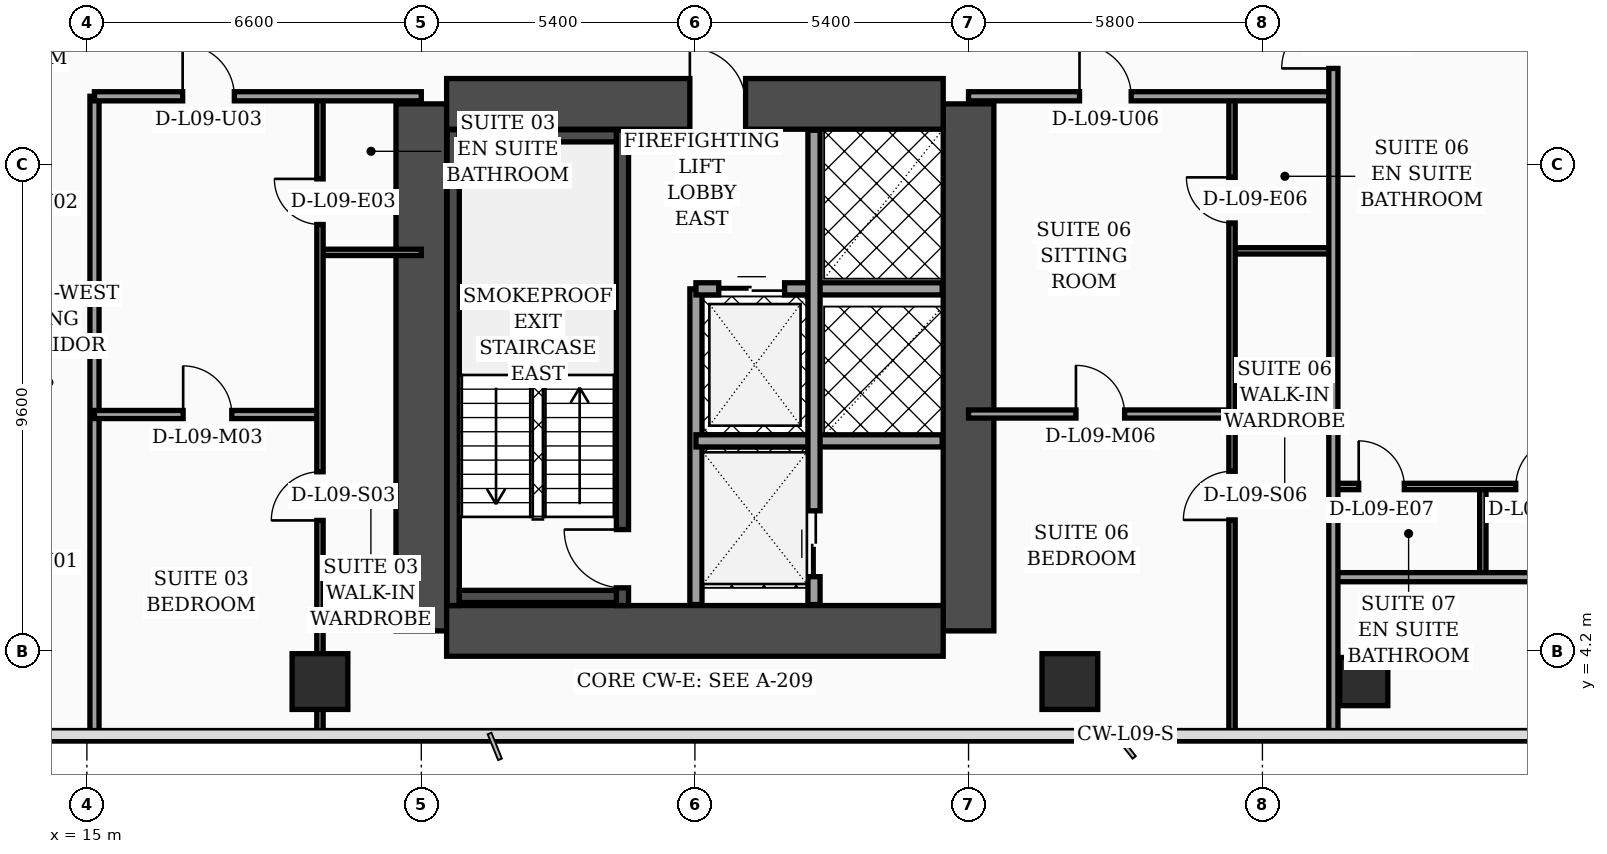
"""IFC4 building model, lengths in metres.
Left out: names, types, materials, properties, quantities, classifications, styles, units other than length and angle.
Written with IfcOpenShell. Run it as: python <this file> out.ifc"""

import sys

from ifc_helpers import new_model, si_unit, direction, frame, frame_2d, origin, origin_2d, place, context, subcontext, project, spatial, rectangle, hollow_rectangle, extrude, element, fill, save


model = new_model("IFC4")
c1 = context("Model", 3, precision=1e-05, world=origin(), true_north=direction((0.0, 1.0)))
c2 = subcontext(c1, "Body", "Model", "MODEL_VIEW")
j1 = project(units=[si_unit("LENGTHUNIT", "METRE"), si_unit("PLANEANGLEUNIT", "RADIAN")], contexts=[c1])
p1 = place(None, origin())
s1 = spatial("IfcSite", under=j1, at=p1, CompositionType="ELEMENT")
p2 = place(p1, origin())
s2 = spatial("IfcBuilding", under=s1, at=p2, CompositionType="ELEMENT")
p3 = place(p2, frame((0.0, 0.0, 42.2)))
s3 = spatial("IfcBuildingStorey", under=s2, at=p3, CompositionType="ELEMENT", Elevation=42.2)
for number, where, z_axis, x_axis in (
    (1, (21.6, 4.6, 0.0), (0.0, 0.0, 1.0), (0.0, 1.0, 0.0)),
    (2, (32.4, 4.6, 0.0), (0.0, 0.0, 1.0), (0.0, 1.0, 0.0)),
):
    element("IfcWall", number, at=place(p3, frame(where, z_axis=z_axis, x_axis=x_axis)), inside=s3, PredefinedType="SHEAR", context=c2, shape_type="SweptSolid", body=[
        extrude(rectangle(XDim=10.4, YDim=1.0, at=frame_2d((5.2, 0.0))), origin(), (0.0, 0.0, 1.0), 3.52),
    ])
p4 = place(p3, frame((22.1, 15.0, 0.0), z_axis=(0.0, 0.0, 1.0), x_axis=(1.0, 0.0, 0.0)))
e3 = element("IfcWall", 3, at=p4, inside=s3, PredefinedType="SHEAR", context=c2, shape_type="SweptSolid", body=[
    extrude(rectangle(XDim=9.8, YDim=1.0, at=frame_2d((4.9, 0.0))), origin(), (0.0, 0.0, 1.0), 3.52),
])
p5 = place(p4, frame((4.8, 0.0, 0.0)))
e4 = element("IfcOpeningElement", 4, at=p5, cuts=e3, PredefinedType="OPENING", context=c2, shape_type="SweptSolid", body=[
    extrude(rectangle(XDim=1.1, YDim=2.2, at=frame_2d((0.55, 1.1))), frame((0.0, 0.51, 0.0), z_axis=(0.0, -1.0, 0.0), x_axis=(1.0, 0.0, 0.0)), (0.0, 0.0, 1.0), 1.02),
])
p6 = place(p3, frame((22.1, 4.6, 0.0), z_axis=(0.0, 0.0, 1.0), x_axis=(1.0, 0.0, 0.0)))
e5 = element("IfcWall", 5, at=p6, inside=s3, PredefinedType="SHEAR", context=c2, shape_type="SweptSolid", body=[
    extrude(rectangle(XDim=9.8, YDim=1.0, at=frame_2d((4.9, 0.0))), origin(), (0.0, 0.0, 1.0), 3.52),
])
p7 = place(p3, frame((22.23, 5.1, 0.0), z_axis=(0.0, 0.0, 1.0), x_axis=(0.0, 1.0, 0.0)))
e6 = element("IfcWall", 6, at=p7, inside=s3, PredefinedType="SOLIDWALL", context=c2, shape_type="SweptSolid", body=[
    extrude(rectangle(XDim=9.39, YDim=0.24, at=frame_2d((4.695, 0.0))), origin(), (0.0, 0.0, 1.0), 3.52),
])
p8 = place(p3, frame((25.57, 5.1, 0.0), z_axis=(0.0, 0.0, 1.0), x_axis=(0.0, 1.0, 0.0)))
e7 = element("IfcWall", 7, at=p8, inside=s3, PredefinedType="SOLIDWALL", context=c2, shape_type="SweptSolid", body=[
    extrude(rectangle(XDim=9.39, YDim=0.24, at=frame_2d((4.695, 0.0))), origin(), (0.0, 0.0, 1.0), 3.52),
])
p9 = place(p8, frame((0.35, 0.0, 0.0)))
e8 = element("IfcOpeningElement", 8, at=p9, cuts=e7, PredefinedType="OPENING", context=c2, shape_type="SweptSolid", body=[
    extrude(rectangle(XDim=1.15, YDim=2.2, at=frame_2d((0.575, 1.1))), frame((0.0, 0.13, 0.0), z_axis=(0.0, -1.0, 0.0), x_axis=(1.0, 0.0, 0.0)), (0.0, 0.0, 1.0), 0.26),
])
for number, where, z_axis, x_axis in (
    (9, (22.35, 5.28, 0.0), (0.0, 0.0, 1.0), (1.0, 0.0, 0.0)),
    (10, (22.35, 14.37, 0.0), (0.0, 0.0, 1.0), (1.0, 0.0, 0.0)),
):
    element("IfcWall", number, at=place(p3, frame(where, z_axis=z_axis, x_axis=x_axis)), inside=s3, PredefinedType="SOLIDWALL", context=c2, shape_type="SweptSolid", body=[
        extrude(rectangle(XDim=3.1, YDim=0.24, at=frame_2d((1.55, 0.0))), origin(), (0.0, 0.0, 1.0), 3.52),
    ])
for number, where, z_axis, x_axis in (
    (11, (19.6, 3.6, 0.0), (0.0, 0.0, 1.0), (1.0, 0.0, 0.0)),
    (12, (34.4, 3.6, 0.0), (0.0, 0.0, 1.0), (1.0, 0.0, 0.0)),
):
    element("IfcColumn", number, at=place(p3, frame(where, z_axis=z_axis, x_axis=x_axis)), inside=s3, PredefinedType="COLUMN", context=c2, shape_type="SweptSolid", body=[
        extrude(hollow_rectangle(XDim=1.1, YDim=1.1, WallThickness=0.045, at=origin_2d()), origin(), (0.0, 0.0, 1.0), 3.52),
    ])
p10 = place(p3, frame((40.2, 3.6, 0.0), z_axis=(0.0, 0.0, 1.0), x_axis=(1.0, 0.0, 0.0)))
e13 = element("IfcColumn", 13, at=p10, inside=s3, PredefinedType="COLUMN", context=c2, shape_type="SweptSolid", body=[
    extrude(hollow_rectangle(XDim=0.95, YDim=0.95, WallThickness=0.04, at=origin_2d()), origin(), (0.0, 0.0, 1.0), 3.52),
])
p11 = place(p3, frame((27.02, 5.12, 0.0), z_axis=(0.0, 0.0, 1.0), x_axis=(0.0, 1.0, 0.0)))
e14 = element("IfcWall", 14, at=p11, inside=s3, PredefinedType="SOLIDWALL", context=c2, shape_type="SweptSolid", body=[
    extrude(rectangle(XDim=6.23, YDim=0.24, at=frame_2d((3.115, 0.0))), origin(), (0.0, 0.0, 1.0), 3.52),
])
p12 = place(p3, frame((27.02, 11.35, 0.0), z_axis=(0.0, 0.0, 1.0), x_axis=(1.0, 0.0, 0.0)))
e15 = element("IfcWall", 15, at=p12, inside=s3, PredefinedType="SOLIDWALL", context=c2, shape_type="SweptSolid", body=[
    extrude(rectangle(XDim=4.86, YDim=0.24, at=frame_2d((2.43, 0.0))), origin(), (0.0, 0.0, 1.0), 3.52),
])
p13 = place(p12, frame((0.45, 0.0, 0.0)))
e16 = element("IfcOpeningElement", 16, at=p13, cuts=e15, PredefinedType="OPENING", context=c2, shape_type="SweptSolid", body=[
    extrude(rectangle(XDim=1.3, YDim=2.35, at=frame_2d((0.65, 1.175))), frame((0.0, 0.13, 0.0), z_axis=(0.0, -1.0, 0.0), x_axis=(1.0, 0.0, 0.0)), (0.0, 0.0, 1.0), 0.26),
])
p14 = place(p3, frame((27.02, 8.35, 0.0), z_axis=(0.0, 0.0, 1.0), x_axis=(1.0, 0.0, 0.0)))
e17 = element("IfcWall", 17, at=p14, inside=s3, PredefinedType="SOLIDWALL", context=c2, shape_type="SweptSolid", body=[
    extrude(rectangle(XDim=4.86, YDim=0.24, at=frame_2d((2.43, 0.0))), origin(), (0.0, 0.0, 1.0), 3.52),
])
p15 = place(p3, frame((29.35, 5.12, 0.0), z_axis=(0.0, 0.0, 1.0), x_axis=(0.0, 1.0, 0.0)))
e18 = element("IfcWall", 18, at=p15, inside=s3, PredefinedType="SOLIDWALL", context=c2, shape_type="SweptSolid", body=[
    extrude(rectangle(XDim=9.36, YDim=0.24, at=frame_2d((4.68, 0.0))), origin(), (0.0, 0.0, 1.0), 3.52),
])
p16 = place(p15, frame((0.55, 0.0, 0.0)))
e19 = element("IfcOpeningElement", 19, at=p16, cuts=e18, PredefinedType="OPENING", context=c2, shape_type="SweptSolid", body=[
    extrude(rectangle(XDim=1.3, YDim=2.35, at=frame_2d((0.65, 1.175))), frame((0.0, 0.13, 0.0), z_axis=(0.0, -1.0, 0.0), x_axis=(1.0, 0.0, 0.0)), (0.0, 0.0, 1.0), 0.26),
])
p17 = place(p3, frame((15.15, 2.44, 0.0), z_axis=(0.0, 0.0, 1.0), x_axis=(0.0, 1.0, 0.0)))
e20 = element("IfcWall", 20, at=p17, inside=s3, PredefinedType="PARTITIONING", context=c2, shape_type="SweptSolid", body=[
    extrude(rectangle(XDim=12.71, YDim=0.18, at=frame_2d((6.355, 0.0))), origin(), (0.0, 0.0, 1.0), 3.02),
])
p18 = place(p3, frame((19.6, 12.07, 0.0), z_axis=(0.0, 0.0, 1.0), x_axis=(1.0, 0.0, 0.0)))
e21 = element("IfcWall", 21, at=p18, inside=s3, PredefinedType="PARTITIONING", context=c2, shape_type="SweptSolid", body=[
    extrude(rectangle(XDim=2.0, YDim=0.125, at=frame_2d((1.0, 0.0))), origin(), (0.0, 0.0, 1.0), 3.52),
])
p19 = place(p3, frame((15.15, 8.87, 0.0), z_axis=(0.0, 0.0, 1.0), x_axis=(1.0, 0.0, 0.0)))
e22 = element("IfcWall", 22, at=p19, inside=s3, PredefinedType="PARTITIONING", context=c2, shape_type="SweptSolid", body=[
    extrude(rectangle(XDim=4.45, YDim=0.16, at=frame_2d((2.225, 0.0))), origin(), (0.0, 0.0, 1.0), 3.52),
])
p20 = place(p19, frame((1.75, 0.0, 0.0)))
e23 = element("IfcOpeningElement", 23, at=p20, cuts=e22, PredefinedType="OPENING", context=c2, shape_type="SweptSolid", body=[
    extrude(rectangle(XDim=0.96, YDim=2.2, at=frame_2d((0.48, 1.1))), frame((0.0, 0.09, 0.0), z_axis=(0.0, -1.0, 0.0), x_axis=(1.0, 0.0, 0.0)), (0.0, 0.0, 1.0), 0.18),
])
p21 = place(p3, frame((19.6, 2.44, 0.0), z_axis=(0.0, 0.0, 1.0), x_axis=(0.0, 1.0, 0.0)))
e24 = element("IfcWall", 24, at=p21, inside=s3, PredefinedType="PARTITIONING", context=c2, shape_type="SweptSolid", body=[
    extrude(rectangle(XDim=12.71, YDim=0.125, at=frame_2d((6.355, 0.0))), origin(), (0.0, 0.0, 1.0), 2.32),
])
p22 = place(p21, frame((4.34, 0.0, 0.0)))
e25 = element("IfcOpeningElement", 25, at=p22, cuts=e24, PredefinedType="OPENING", context=c2, shape_type="SweptSolid", body=[
    extrude(rectangle(XDim=0.96, YDim=2.2, at=frame_2d((0.48, 1.1))), frame((0.0, 0.073, 0.0), z_axis=(0.0, -1.0, 0.0), x_axis=(1.0, 0.0, 0.0)), (0.0, 0.0, 1.0), 0.145),
])
p23 = place(p21, frame((10.18, 0.0, 0.0)))
e26 = element("IfcOpeningElement", 26, at=p23, cuts=e24, PredefinedType="OPENING", context=c2, shape_type="SweptSolid", body=[
    extrude(rectangle(XDim=0.9, YDim=2.15, at=frame_2d((0.45, 1.075))), frame((0.0, 0.073, 0.0), z_axis=(0.0, -1.0, 0.0), x_axis=(1.0, 0.0, 0.0)), (0.0, 0.0, 1.0), 0.145),
])
p24 = place(p3, frame((15.15, 15.15, 0.0), z_axis=(0.0, 0.0, 1.0), x_axis=(1.0, 0.0, 0.0)))
e27 = element("IfcWall", 27, at=p24, inside=s3, PredefinedType="PARTITIONING", context=c2, shape_type="SweptSolid", body=[
    extrude(rectangle(XDim=6.45, YDim=0.18, at=frame_2d((3.225, 0.0))), origin(), (0.0, 0.0, 1.0), 2.32),
])
p25 = place(p24, frame((1.74, 0.0, 0.0)))
e28 = element("IfcOpeningElement", 28, at=p25, cuts=e27, PredefinedType="OPENING", context=c2, shape_type="SweptSolid", body=[
    extrude(rectangle(XDim=1.02, YDim=2.2, at=frame_2d((0.51, 1.1))), frame((0.0, 0.1, 0.0), z_axis=(0.0, -1.0, 0.0), x_axis=(1.0, 0.0, 0.0)), (0.0, 0.0, 1.0), 0.2),
])
p26 = place(p3, frame((37.6, 12.1, 0.0), z_axis=(0.0, 0.0, 1.0), x_axis=(1.0, 0.0, 0.0)))
e29 = element("IfcWall", 29, at=p26, inside=s3, PredefinedType="PARTITIONING", context=c2, shape_type="SweptSolid", body=[
    extrude(rectangle(XDim=2.0, YDim=0.125, at=frame_2d((1.0, 0.0))), origin(), (0.0, 0.0, 1.0), 3.52),
])
p27 = place(p3, frame((32.4, 8.88, 0.0), z_axis=(0.0, 0.0, 1.0), x_axis=(1.0, 0.0, 0.0)))
e30 = element("IfcWall", 30, at=p27, inside=s3, PredefinedType="PARTITIONING", context=c2, shape_type="SweptSolid", body=[
    extrude(rectangle(XDim=5.2, YDim=0.16, at=frame_2d((2.6, 0.0))), origin(), (0.0, 0.0, 1.0), 2.82),
])
p28 = place(p27, frame((2.12, 0.0, 0.0)))
e31 = element("IfcOpeningElement", 31, at=p28, cuts=e30, PredefinedType="OPENING", context=c2, shape_type="SweptSolid", body=[
    extrude(rectangle(XDim=0.96, YDim=2.2, at=frame_2d((0.48, 1.1))), frame((0.0, 0.09, 0.0), z_axis=(0.0, -1.0, 0.0), x_axis=(1.0, 0.0, 0.0)), (0.0, 0.0, 1.0), 0.18),
])
p29 = place(p3, frame((37.6, 2.44, 0.0), z_axis=(0.0, 0.0, 1.0), x_axis=(0.0, 1.0, 0.0)))
e32 = element("IfcWall", 32, at=p29, inside=s3, PredefinedType="PARTITIONING", context=c2, shape_type="SweptSolid", body=[
    extrude(rectangle(XDim=12.71, YDim=0.125, at=frame_2d((6.355, 0.0))), origin(), (0.0, 0.0, 1.0), 2.82),
])
p30 = place(p29, frame((4.35, 0.0, 0.0)))
e33 = element("IfcOpeningElement", 33, at=p30, cuts=e32, PredefinedType="OPENING", context=c2, shape_type="SweptSolid", body=[
    extrude(rectangle(XDim=0.96, YDim=2.2, at=frame_2d((0.48, 1.1))), frame((0.0, 0.073, 0.0), z_axis=(0.0, -1.0, 0.0), x_axis=(1.0, 0.0, 0.0)), (0.0, 0.0, 1.0), 0.145),
])
p31 = place(p29, frame((10.21, 0.0, 0.0)))
e34 = element("IfcOpeningElement", 34, at=p31, cuts=e32, PredefinedType="OPENING", context=c2, shape_type="SweptSolid", body=[
    extrude(rectangle(XDim=0.9, YDim=2.15, at=frame_2d((0.45, 1.075))), frame((0.0, 0.073, 0.0), z_axis=(0.0, -1.0, 0.0), x_axis=(1.0, 0.0, 0.0)), (0.0, 0.0, 1.0), 0.145),
])
p32 = place(p3, frame((32.4, 15.15, 0.0), z_axis=(0.0, 0.0, 1.0), x_axis=(1.0, 0.0, 0.0)))
e35 = element("IfcWall", 35, at=p32, inside=s3, PredefinedType="PARTITIONING", context=c2, shape_type="SweptSolid", body=[
    extrude(rectangle(XDim=7.2, YDim=0.18, at=frame_2d((3.6, 0.0))), origin(), (0.0, 0.0, 1.0), 2.82),
])
p33 = place(p32, frame((2.19, 0.0, 0.0)))
e36 = element("IfcOpeningElement", 36, at=p33, cuts=e35, PredefinedType="OPENING", context=c2, shape_type="SweptSolid", body=[
    extrude(rectangle(XDim=1.02, YDim=2.2, at=frame_2d((0.51, 1.1))), frame((0.0, 0.1, 0.0), z_axis=(0.0, -1.0, 0.0), x_axis=(1.0, 0.0, 0.0)), (0.0, 0.0, 1.0), 0.2),
])
p34 = place(p3, frame((42.55, 5.66, 0.0), z_axis=(0.0, 0.0, 1.0), x_axis=(0.0, 1.0, 0.0)))
e37 = element("IfcWall", 37, at=p34, inside=s3, PredefinedType="PARTITIONING", context=c2, shape_type="SweptSolid", body=[
    extrude(rectangle(XDim=1.79, YDim=0.125, at=frame_2d((0.895, 0.0))), origin(), (0.0, 0.0, 1.0), 3.52),
])
p35 = place(p3, frame((39.6, 7.45, 0.0), z_axis=(0.0, 0.0, 1.0), x_axis=(1.0, 0.0, 0.0)))
e38 = element("IfcWall", 38, at=p35, inside=s3, PredefinedType="PARTITIONING", context=c2, shape_type="SweptSolid", body=[
    extrude(rectangle(XDim=23.36, YDim=0.125, at=frame_2d((11.68, 0.0))), origin(), (0.0, 0.0, 1.0), 2.82),
])
p36 = place(p35, frame((0.5, 0.0, 0.0)))
e39 = element("IfcOpeningElement", 39, at=p36, cuts=e38, PredefinedType="OPENING", context=c2, shape_type="SweptSolid", body=[
    extrude(rectangle(XDim=0.9, YDim=2.15, at=frame_2d((0.45, 1.075))), frame((0.0, 0.073, 0.0), z_axis=(0.0, -1.0, 0.0), x_axis=(1.0, 0.0, 0.0)), (0.0, 0.0, 1.0), 0.145),
])
p37 = place(p35, frame((3.6, 0.0, 0.0)))
e40 = element("IfcOpeningElement", 40, at=p37, cuts=e38, PredefinedType="OPENING", context=c2, shape_type="SweptSolid", body=[
    extrude(rectangle(XDim=0.96, YDim=2.2, at=frame_2d((0.48, 1.1))), frame((0.0, 0.073, 0.0), z_axis=(0.0, -1.0, 0.0), x_axis=(1.0, 0.0, 0.0)), (0.0, 0.0, 1.0), 0.145),
])
p38 = place(p3, frame((39.6, 5.66, 0.0), z_axis=(0.0, 0.0, 1.0), x_axis=(1.0, 0.0, 0.0)))
e41 = element("IfcWall", 41, at=p38, inside=s3, PredefinedType="PARTITIONING", context=c2, shape_type="SweptSolid", body=[
    extrude(rectangle(XDim=20.8, YDim=0.18, at=frame_2d((10.4, 0.0))), origin(), (0.0, 0.0, 1.0), 2.82),
])
p39 = place(p3, frame((39.6, 2.44, 0.0), z_axis=(0.0, 0.0, 1.0), x_axis=(0.0, 1.0, 0.0)))
e42 = element("IfcWall", 42, at=p39, inside=s3, PredefinedType="PARTITIONING", context=c2, shape_type="SweptSolid", body=[
    extrude(rectangle(XDim=31.04, YDim=0.18, at=frame_2d((15.52, 0.0))), origin(), (0.0, 0.0, 1.0), 2.82),
])
p40 = place(p39, frame((13.26, 0.0, 0.0)))
e43 = element("IfcOpeningElement", 43, at=p40, cuts=e42, PredefinedType="OPENING", context=c2, shape_type="SweptSolid", body=[
    extrude(rectangle(XDim=1.02, YDim=2.2, at=frame_2d((0.51, 1.1))), frame((0.0, 0.1, 0.0), z_axis=(0.0, -1.0, 0.0), x_axis=(1.0, 0.0, 0.0)), (0.0, 0.0, 1.0), 0.2),
])
p41 = place(p39, frame((17.77, 0.0, 0.0)))
e44 = element("IfcOpeningElement", 44, at=p41, cuts=e42, PredefinedType="OPENING", context=c2, shape_type="SweptSolid", body=[
    extrude(rectangle(XDim=1.02, YDim=2.2, at=frame_2d((0.51, 1.1))), frame((0.0, 0.1, 0.0), z_axis=(0.0, -1.0, 0.0), x_axis=(1.0, 0.0, 0.0)), (0.0, 0.0, 1.0), 0.2),
])
p42 = place(p39, frame((25.58, 0.0, 0.0)))
e45 = element("IfcOpeningElement", 45, at=p42, cuts=e42, PredefinedType="OPENING", context=c2, shape_type="SweptSolid", body=[
    extrude(rectangle(XDim=1.02, YDim=2.2, at=frame_2d((0.51, 1.1))), frame((0.0, 0.1, 0.0), z_axis=(0.0, -1.0, 0.0), x_axis=(1.0, 0.0, 0.0)), (0.0, 0.0, 1.0), 0.2),
])
p43 = place(p13, origin())
e46 = element("IfcDoor", 46, at=p43, inside=s3, OperationType="DOUBLE_DOOR_SLIDING", PredefinedType="DOOR", context=c2, shape_type="SweptSolid", body=[
    extrude(rectangle(XDim=1.3, YDim=2.35, at=frame_2d((0.65, 1.175))), frame((0.0, 0.025, 0.0), z_axis=(0.0, -1.0, 0.0), x_axis=(1.0, 0.0, 0.0)), (0.0, 0.0, 1.0), 0.05),
])
fill(e16, e46)
p44 = place(p16, origin())
e47 = element("IfcDoor", 47, at=p44, inside=s3, OperationType="DOUBLE_DOOR_SLIDING", PredefinedType="DOOR", context=c2, shape_type="SweptSolid", body=[
    extrude(rectangle(XDim=1.3, YDim=2.35, at=frame_2d((0.65, 1.175))), frame((0.0, 0.025, 0.0), z_axis=(0.0, -1.0, 0.0), x_axis=(1.0, 0.0, 0.0)), (0.0, 0.0, 1.0), 0.05),
])
fill(e19, e47)
p45 = place(p20, origin())
e48 = element("IfcDoor", 48, at=p45, inside=s3, OperationType="SINGLE_SWING_LEFT", PredefinedType="DOOR", context=c2, shape_type="SweptSolid", body=[
    extrude(rectangle(XDim=0.96, YDim=2.2, at=frame_2d((0.48, 1.1))), frame((0.0, 0.025, 0.0), z_axis=(0.0, -1.0, 0.0), x_axis=(1.0, 0.0, 0.0)), (0.0, 0.0, 1.0), 0.05),
])
fill(e23, e48)
p46 = place(p22, origin())
e49 = element("IfcDoor", 49, at=p46, inside=s3, OperationType="SINGLE_SWING_LEFT", PredefinedType="DOOR", context=c2, shape_type="SweptSolid", body=[
    extrude(rectangle(XDim=0.96, YDim=2.2, at=frame_2d((0.48, 1.1))), frame((0.0, 0.025, 0.0), z_axis=(0.0, -1.0, 0.0), x_axis=(1.0, 0.0, 0.0)), (0.0, 0.0, 1.0), 0.05),
])
fill(e25, e49)
p47 = place(p23, origin())
e50 = element("IfcDoor", 50, at=p47, inside=s3, OperationType="SINGLE_SWING_RIGHT", PredefinedType="DOOR", context=c2, shape_type="SweptSolid", body=[
    extrude(rectangle(XDim=0.9, YDim=2.15, at=frame_2d((0.45, 1.075))), frame((0.0, 0.025, 0.0), z_axis=(0.0, -1.0, 0.0), x_axis=(1.0, 0.0, 0.0)), (0.0, 0.0, 1.0), 0.05),
])
fill(e26, e50)
p48 = place(p25, origin())
e51 = element("IfcDoor", 51, at=p48, inside=s3, OperationType="SINGLE_SWING_LEFT", PredefinedType="DOOR", context=c2, shape_type="SweptSolid", body=[
    extrude(rectangle(XDim=1.02, YDim=2.2, at=frame_2d((0.51, 1.1))), frame((0.0, 0.025, 0.0), z_axis=(0.0, -1.0, 0.0), x_axis=(1.0, 0.0, 0.0)), (0.0, 0.0, 1.0), 0.05),
])
fill(e28, e51)
p49 = place(p28, origin())
e52 = element("IfcDoor", 52, at=p49, inside=s3, OperationType="SINGLE_SWING_LEFT", PredefinedType="DOOR", context=c2, shape_type="SweptSolid", body=[
    extrude(rectangle(XDim=0.96, YDim=2.2, at=frame_2d((0.48, 1.1))), frame((0.0, 0.025, 0.0), z_axis=(0.0, -1.0, 0.0), x_axis=(1.0, 0.0, 0.0)), (0.0, 0.0, 1.0), 0.05),
])
fill(e31, e52)
p50 = place(p30, origin())
e53 = element("IfcDoor", 53, at=p50, inside=s3, OperationType="SINGLE_SWING_LEFT", PredefinedType="DOOR", context=c2, shape_type="SweptSolid", body=[
    extrude(rectangle(XDim=0.96, YDim=2.2, at=frame_2d((0.48, 1.1))), frame((0.0, 0.025, 0.0), z_axis=(0.0, -1.0, 0.0), x_axis=(1.0, 0.0, 0.0)), (0.0, 0.0, 1.0), 0.05),
])
fill(e33, e53)
p51 = place(p31, origin())
e54 = element("IfcDoor", 54, at=p51, inside=s3, OperationType="SINGLE_SWING_RIGHT", PredefinedType="DOOR", context=c2, shape_type="SweptSolid", body=[
    extrude(rectangle(XDim=0.9, YDim=2.15, at=frame_2d((0.45, 1.075))), frame((0.0, 0.025, 0.0), z_axis=(0.0, -1.0, 0.0), x_axis=(1.0, 0.0, 0.0)), (0.0, 0.0, 1.0), 0.05),
])
fill(e34, e54)
p52 = place(p33, origin())
e55 = element("IfcDoor", 55, at=p52, inside=s3, OperationType="SINGLE_SWING_LEFT", PredefinedType="DOOR", context=c2, shape_type="SweptSolid", body=[
    extrude(rectangle(XDim=1.02, YDim=2.2, at=frame_2d((0.51, 1.1))), frame((0.0, 0.025, 0.0), z_axis=(0.0, -1.0, 0.0), x_axis=(1.0, 0.0, 0.0)), (0.0, 0.0, 1.0), 0.05),
])
fill(e36, e55)
p53 = place(p36, origin())
e56 = element("IfcDoor", 56, at=p53, inside=s3, OperationType="SINGLE_SWING_LEFT", PredefinedType="DOOR", context=c2, shape_type="SweptSolid", body=[
    extrude(rectangle(XDim=0.9, YDim=2.15, at=frame_2d((0.45, 1.075))), frame((0.0, 0.025, 0.0), z_axis=(0.0, -1.0, 0.0), x_axis=(1.0, 0.0, 0.0)), (0.0, 0.0, 1.0), 0.05),
])
fill(e39, e56)
p54 = place(p37, origin())
e57 = element("IfcDoor", 57, at=p54, inside=s3, OperationType="SINGLE_SWING_RIGHT", PredefinedType="DOOR", context=c2, shape_type="SweptSolid", body=[
    extrude(rectangle(XDim=0.96, YDim=2.2, at=frame_2d((0.48, 1.1))), frame((0.0, 0.025, 0.0), z_axis=(0.0, -1.0, 0.0), x_axis=(1.0, 0.0, 0.0)), (0.0, 0.0, 1.0), 0.05),
])
fill(e40, e57)
p55 = place(p40, origin())
e58 = element("IfcDoor", 58, at=p55, inside=s3, OperationType="SINGLE_SWING_LEFT", PredefinedType="DOOR", context=c2, shape_type="SweptSolid", body=[
    extrude(rectangle(XDim=1.02, YDim=2.2, at=frame_2d((0.51, 1.1))), frame((0.0, 0.025, 0.0), z_axis=(0.0, -1.0, 0.0), x_axis=(1.0, 0.0, 0.0)), (0.0, 0.0, 1.0), 0.05),
])
fill(e43, e58)
p56 = place(p9, origin())
e59 = element("IfcDoor", 59, at=p56, inside=s3, OperationType="SINGLE_SWING_RIGHT", PredefinedType="DOOR", context=c2, shape_type="SweptSolid", body=[
    extrude(rectangle(XDim=1.15, YDim=2.2, at=frame_2d((0.575, 1.1))), frame((0.0, 0.025, 0.0), z_axis=(0.0, -1.0, 0.0), x_axis=(1.0, 0.0, 0.0)), (0.0, 0.0, 1.0), 0.05),
])
fill(e8, e59)
p57 = place(p5, origin())
e60 = element("IfcDoor", 60, at=p57, inside=s3, OperationType="SINGLE_SWING_LEFT", PredefinedType="DOOR", context=c2, shape_type="SweptSolid", body=[
    extrude(rectangle(XDim=1.1, YDim=2.2, at=frame_2d((0.55, 1.1))), frame((0.0, 0.025, 0.0), z_axis=(0.0, -1.0, 0.0), x_axis=(1.0, 0.0, 0.0)), (0.0, 0.0, 1.0), 0.05),
])
fill(e4, e60)
save(model, sys.argv[1])
